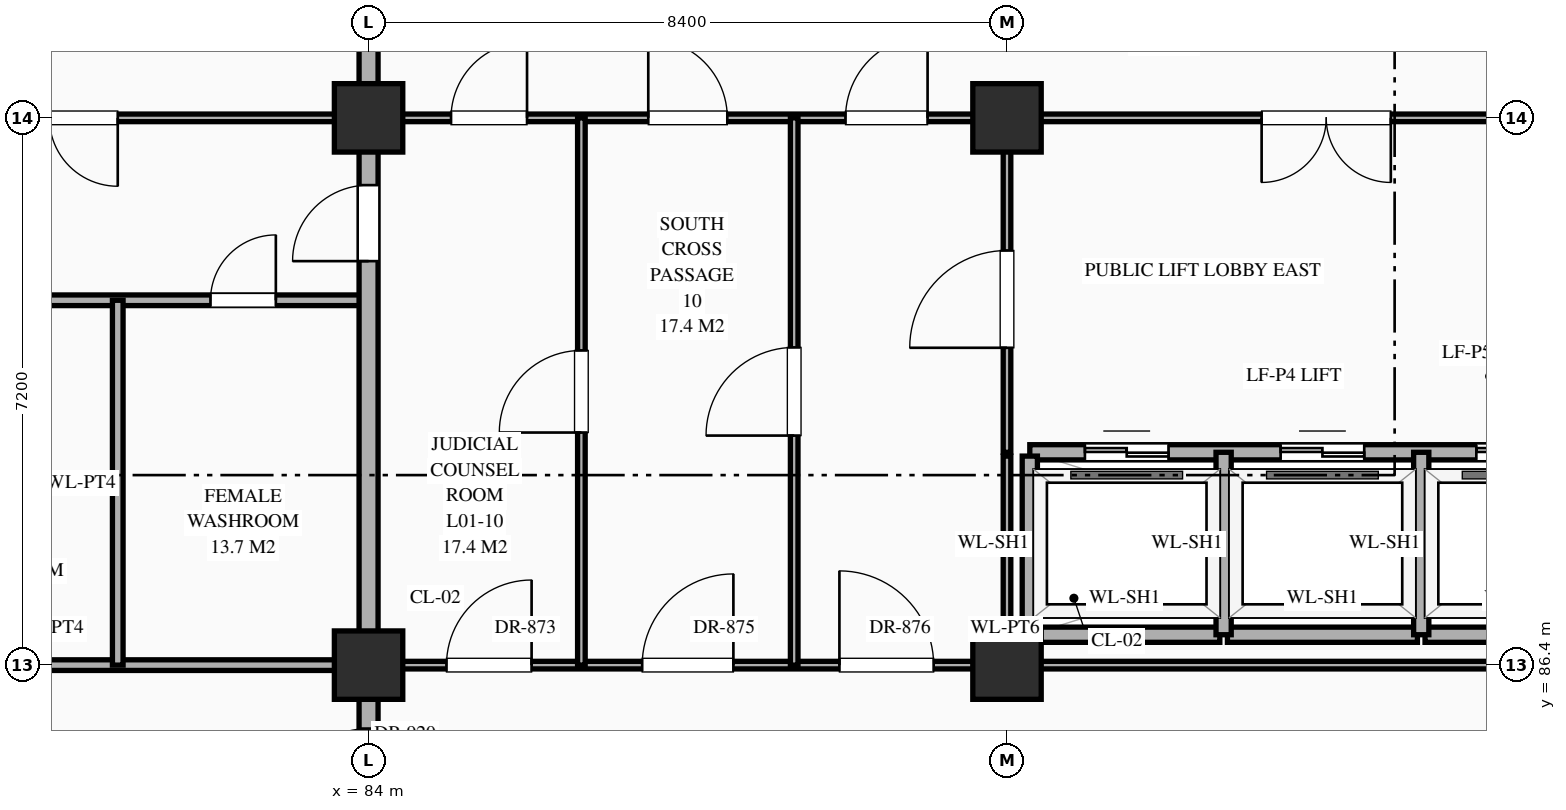
"""IFC4 building model, lengths in metres.
Left out: names, types, materials, properties, quantities, classifications, styles, units other than length and angle.
Written with IfcOpenShell. Run it as: python <this file> out.ifc"""

import sys

from ifc_helpers import new_model, si_unit, direction, frame, frame_2d, origin, origin_2d, place, context, subcontext, project, spatial, rectangle, extrude, element, fill, save


model = new_model("IFC4")
c1 = context("Model", 3, precision=1e-05, world=origin(), true_north=direction((0.0, 1.0)))
c2 = subcontext(c1, "Body", "Model", "MODEL_VIEW")
j1 = project(units=[si_unit("LENGTHUNIT", "METRE"), si_unit("PLANEANGLEUNIT", "RADIAN")], contexts=[c1])
p1 = place(None, origin())
s1 = spatial("IfcSite", under=j1, at=p1, CompositionType="ELEMENT")
p2 = place(p1, origin())
s2 = spatial("IfcBuilding", under=s1, at=p2, CompositionType="ELEMENT")
p3 = place(p2, origin())
s3 = spatial("IfcBuildingStorey", under=s2, at=p3, CompositionType="ELEMENT", Elevation=0.0)
for number, where, z_axis, x_axis in (
    (1, (84.0, 86.4, 0.0), (0.0, 0.0, 1.0), (1.0, 0.0, 0.0)),
    (2, (84.0, 93.6, 0.0), (0.0, 0.0, 1.0), (1.0, 0.0, 0.0)),
    (3, (92.4, 86.4, 0.0), (0.0, 0.0, 1.0), (1.0, 0.0, 0.0)),
    (4, (92.4, 93.6, 0.0), (0.0, 0.0, 1.0), (1.0, 0.0, 0.0)),
):
    element("IfcColumn", number, at=place(p3, frame(where, z_axis=z_axis, x_axis=x_axis)), inside=s3, PredefinedType="COLUMN", context=c2, shape_type="SweptSolid", body=[
        extrude(rectangle(XDim=0.9, YDim=0.9, at=origin_2d()), origin(), (0.0, 0.0, 1.0), 5.4),
    ])
p4 = place(p3, frame((75.6, 86.4, 0.0), z_axis=(0.0, 0.0, 1.0), x_axis=(1.0, 0.0, 0.0)))
e5 = element("IfcWall", 5, at=p4, inside=s3, PredefinedType="STANDARD", context=c2, shape_type="SweptSolid", body=[
    extrude(rectangle(XDim=8.4, YDim=0.14, at=frame_2d((4.2, 0.0))), origin(), (0.0, 0.0, 1.0), 4.27),
])
p5 = place(p3, frame((84.0, 86.4, 0.0), z_axis=(0.0, 0.0, 1.0), x_axis=(1.0, 0.0, 0.0)))
e6 = element("IfcWall", 6, at=p5, inside=s3, PredefinedType="STANDARD", context=c2, shape_type="SweptSolid", body=[
    extrude(rectangle(XDim=8.4, YDim=0.1, at=frame_2d((4.2, 0.0))), origin(), (0.0, 0.0, 1.0), 4.27),
])
p6 = place(p5, frame((1.025, 0.0, 0.0)))
e7 = element("IfcOpeningElement", 7, at=p6, cuts=e6, PredefinedType="OPENING", context=c2, shape_type="SweptSolid", body=[
    extrude(rectangle(XDim=1.12, YDim=2.25, at=frame_2d((0.56, 1.125))), frame((0.0, 0.062, 0.0), z_axis=(0.0, -1.0, 0.0), x_axis=(1.0, 0.0, 0.0)), (0.0, 0.0, 1.0), 0.124),
])
p7 = place(p5, frame((3.6, 0.0, 0.0)))
e8 = element("IfcOpeningElement", 8, at=p7, cuts=e6, PredefinedType="OPENING", context=c2, shape_type="SweptSolid", body=[
    extrude(rectangle(XDim=1.2, YDim=2.35, at=frame_2d((0.6, 1.175))), frame((0.0, 0.062, 0.0), z_axis=(0.0, -1.0, 0.0), x_axis=(1.0, 0.0, 0.0)), (0.0, 0.0, 1.0), 0.124),
])
p8 = place(p5, frame((6.195, 0.0, 0.0)))
e9 = element("IfcOpeningElement", 9, at=p8, cuts=e6, PredefinedType="OPENING", context=c2, shape_type="SweptSolid", body=[
    extrude(rectangle(XDim=1.24, YDim=2.3, at=frame_2d((0.62, 1.15))), frame((0.0, 0.062, 0.0), z_axis=(0.0, -1.0, 0.0), x_axis=(1.0, 0.0, 0.0)), (0.0, 0.0, 1.0), 0.124),
])
p9 = place(p3, frame((92.45, 86.4, 0.0), z_axis=(0.0, 0.0, 1.0), x_axis=(1.0, 0.0, 0.0)))
e10 = element("IfcWall", 10, at=p9, inside=s3, PredefinedType="STANDARD", context=c2, shape_type="SweptSolid", body=[
    extrude(rectangle(XDim=8.3, YDim=0.1, at=frame_2d((4.15, 0.0))), origin(), (0.0, 0.0, 1.0), 4.27),
])
for number, where, z_axis, x_axis in (
    (11, (92.7, 86.8, 0.0), (0.0, 0.0, 1.0), (1.0, 0.0, 0.0)),
    (12, (95.3, 86.8, 0.0), (0.0, 0.0, 1.0), (1.0, 0.0, 0.0)),
    (13, (97.9, 86.8, 0.0), (0.0, 0.0, 1.0), (1.0, 0.0, 0.0)),
):
    element("IfcWall", number, at=place(p3, frame(where, z_axis=z_axis, x_axis=x_axis)), inside=s3, PredefinedType="STANDARD", context=c2, shape_type="SweptSolid", body=[
        extrude(rectangle(XDim=2.5, YDim=0.2, at=frame_2d((1.25, 0.0))), origin(), (0.0, 0.0, 1.0), 5.12),
    ])
p10 = place(p3, frame((92.7, 89.2, 0.0), z_axis=(0.0, 0.0, 1.0), x_axis=(1.0, 0.0, 0.0)))
e14 = element("IfcWall", 14, at=p10, inside=s3, PredefinedType="STANDARD", context=c2, shape_type="SweptSolid", body=[
    extrude(rectangle(XDim=7.7, YDim=0.2, at=frame_2d((3.85, 0.0))), origin(), (0.0, 0.0, 1.0), 5.12),
])
p11 = place(p10, frame((0.725, 0.0, 0.0)))
e15 = element("IfcOpeningElement", 15, at=p11, cuts=e14, PredefinedType="OPENING", context=c2, shape_type="SweptSolid", body=[
    extrude(rectangle(XDim=1.1, YDim=2.15, at=frame_2d((0.55, 1.075))), frame((0.0, 0.112, 0.0), z_axis=(0.0, -1.0, 0.0), x_axis=(1.0, 0.0, 0.0)), (0.0, 0.0, 1.0), 0.224),
])
p12 = place(p10, frame((3.3, 0.0, 0.0)))
e16 = element("IfcOpeningElement", 16, at=p12, cuts=e14, PredefinedType="OPENING", context=c2, shape_type="SweptSolid", body=[
    extrude(rectangle(XDim=1.1, YDim=2.15, at=frame_2d((0.55, 1.075))), frame((0.0, 0.112, 0.0), z_axis=(0.0, -1.0, 0.0), x_axis=(1.0, 0.0, 0.0)), (0.0, 0.0, 1.0), 0.224),
])
p13 = place(p10, frame((5.875, 0.0, 0.0)))
e17 = element("IfcOpeningElement", 17, at=p13, cuts=e14, PredefinedType="OPENING", context=c2, shape_type="SweptSolid", body=[
    extrude(rectangle(XDim=1.1, YDim=2.15, at=frame_2d((0.55, 1.075))), frame((0.0, 0.112, 0.0), z_axis=(0.0, -1.0, 0.0), x_axis=(1.0, 0.0, 0.0)), (0.0, 0.0, 1.0), 0.224),
])
p14 = place(p3, frame((75.6, 91.2, 0.0), z_axis=(0.0, 0.0, 1.0), x_axis=(1.0, 0.0, 0.0)))
e18 = element("IfcWall", 18, at=p14, inside=s3, PredefinedType="STANDARD", context=c2, shape_type="SweptSolid", body=[
    extrude(rectangle(XDim=8.4, YDim=0.14, at=frame_2d((4.2, 0.0))), origin(), (0.0, 0.0, 1.0), 5.12),
])
p15 = place(p14, frame((0.65, 0.0, 0.0)))
e19 = element("IfcOpeningElement", 19, at=p15, cuts=e18, PredefinedType="OPENING", context=c2, shape_type="SweptSolid", body=[
    extrude(rectangle(XDim=0.9, YDim=2.15, at=frame_2d((0.45, 1.075))), frame((0.0, 0.082, 0.0), z_axis=(0.0, -1.0, 0.0), x_axis=(1.0, 0.0, 0.0)), (0.0, 0.0, 1.0), 0.164),
])
p16 = place(p14, frame((3.22, 0.0, 0.0)))
e20 = element("IfcOpeningElement", 20, at=p16, cuts=e18, PredefinedType="OPENING", context=c2, shape_type="SweptSolid", body=[
    extrude(rectangle(XDim=0.86, YDim=2.1, at=frame_2d((0.43, 1.05))), frame((0.0, 0.082, 0.0), z_axis=(0.0, -1.0, 0.0), x_axis=(1.0, 0.0, 0.0)), (0.0, 0.0, 1.0), 0.164),
])
p17 = place(p14, frame((6.32, 0.0, 0.0)))
e21 = element("IfcOpeningElement", 21, at=p17, cuts=e18, PredefinedType="OPENING", context=c2, shape_type="SweptSolid", body=[
    extrude(rectangle(XDim=0.86, YDim=2.1, at=frame_2d((0.43, 1.05))), frame((0.0, 0.082, 0.0), z_axis=(0.0, -1.0, 0.0), x_axis=(1.0, 0.0, 0.0)), (0.0, 0.0, 1.0), 0.164),
])
p18 = place(p3, frame((67.2, 93.6, 0.0), z_axis=(0.0, 0.0, 1.0), x_axis=(1.0, 0.0, 0.0)))
e22 = element("IfcWall", 22, at=p18, inside=s3, PredefinedType="STANDARD", context=c2, shape_type="SweptSolid", body=[
    extrude(rectangle(XDim=33.6, YDim=0.1, at=frame_2d((16.8, 0.0))), origin(), (0.0, 0.0, 1.0), 4.27),
])
p19 = place(p18, frame((3.425, 0.0, 0.0)))
e23 = element("IfcOpeningElement", 23, at=p19, cuts=e22, PredefinedType="OPENING", context=c2, shape_type="SweptSolid", body=[
    extrude(rectangle(XDim=1.55, YDim=2.35, at=frame_2d((0.775, 1.175))), frame((0.0, 0.062, 0.0), z_axis=(0.0, -1.0, 0.0), x_axis=(1.0, 0.0, 0.0)), (0.0, 0.0, 1.0), 0.124),
])
p20 = place(p18, frame((28.55, 0.0, 0.0)))
e24 = element("IfcOpeningElement", 24, at=p20, cuts=e22, PredefinedType="OPENING", context=c2, shape_type="SweptSolid", body=[
    extrude(rectangle(XDim=1.7, YDim=2.45, at=frame_2d((0.85, 1.225))), frame((0.0, 0.062, 0.0), z_axis=(0.0, -1.0, 0.0), x_axis=(1.0, 0.0, 0.0)), (0.0, 0.0, 1.0), 0.124),
])
p21 = place(p18, frame((11.7, 0.0, 0.0)))
e25 = element("IfcOpeningElement", 25, at=p21, cuts=e22, PredefinedType="OPENING", context=c2, shape_type="SweptSolid", body=[
    extrude(rectangle(XDim=1.8, YDim=2.5, at=frame_2d((0.9, 1.25))), frame((0.0, 0.062, 0.0), z_axis=(0.0, -1.0, 0.0), x_axis=(1.0, 0.0, 0.0)), (0.0, 0.0, 1.0), 0.124),
])
p22 = place(p18, frame((17.885, 0.0, 0.0)))
e26 = element("IfcOpeningElement", 26, at=p22, cuts=e22, PredefinedType="OPENING", context=c2, shape_type="SweptSolid", body=[
    extrude(rectangle(XDim=1.0, YDim=2.25, at=frame_2d((0.5, 1.125))), frame((0.0, 0.062, 0.0), z_axis=(0.0, -1.0, 0.0), x_axis=(1.0, 0.0, 0.0)), (0.0, 0.0, 1.0), 0.124),
])
p23 = place(p18, frame((20.48, 0.0, 0.0)))
e27 = element("IfcOpeningElement", 27, at=p23, cuts=e22, PredefinedType="OPENING", context=c2, shape_type="SweptSolid", body=[
    extrude(rectangle(XDim=1.04, YDim=2.2, at=frame_2d((0.52, 1.1))), frame((0.0, 0.062, 0.0), z_axis=(0.0, -1.0, 0.0), x_axis=(1.0, 0.0, 0.0)), (0.0, 0.0, 1.0), 0.124),
])
p24 = place(p18, frame((23.075, 0.0, 0.0)))
e28 = element("IfcOpeningElement", 28, at=p24, cuts=e22, PredefinedType="OPENING", context=c2, shape_type="SweptSolid", body=[
    extrude(rectangle(XDim=1.08, YDim=2.25, at=frame_2d((0.54, 1.125))), frame((0.0, 0.062, 0.0), z_axis=(0.0, -1.0, 0.0), x_axis=(1.0, 0.0, 0.0)), (0.0, 0.0, 1.0), 0.124),
])
p25 = place(p3, frame((80.7, 86.4, 0.0), z_axis=(0.0, 0.0, 1.0), x_axis=(0.0, 1.0, 0.0)))
e29 = element("IfcWall", 29, at=p25, inside=s3, PredefinedType="STANDARD", context=c2, shape_type="SweptSolid", body=[
    extrude(rectangle(XDim=4.8, YDim=0.14, at=frame_2d((2.4, 0.0))), origin(), (0.0, 0.0, 1.0), 5.12),
])
p26 = place(p3, frame((84.0, 84.0, 0.0), z_axis=(0.0, 0.0, 1.0), x_axis=(0.0, 1.0, 0.0)))
e30 = element("IfcWall", 30, at=p26, inside=s3, PredefinedType="STANDARD", context=c2, shape_type="SweptSolid", body=[
    extrude(rectangle(XDim=12.0, YDim=0.25, at=frame_2d((6.0, 0.0))), origin(), (0.0, 0.0, 1.0), 4.37),
])
p27 = place(p26, frame((7.715, 0.0, 0.0)))
e31 = element("IfcOpeningElement", 31, at=p27, cuts=e30, PredefinedType="OPENING", context=c2, shape_type="SweptSolid", body=[
    extrude(rectangle(XDim=1.0, YDim=2.2, at=frame_2d((0.5, 1.1))), frame((0.0, 0.137, 0.0), z_axis=(0.0, -1.0, 0.0), x_axis=(1.0, 0.0, 0.0)), (0.0, 0.0, 1.0), 0.274),
])
p28 = place(p26, frame((10.485, 0.0, 0.0)))
e32 = element("IfcOpeningElement", 32, at=p28, cuts=e30, PredefinedType="OPENING", context=c2, shape_type="SweptSolid", body=[
    extrude(rectangle(XDim=1.0, YDim=2.2, at=frame_2d((0.5, 1.1))), frame((0.0, 0.137, 0.0), z_axis=(0.0, -1.0, 0.0), x_axis=(1.0, 0.0, 0.0)), (0.0, 0.0, 1.0), 0.274),
])
p29 = place(p26, frame((0.465, 0.0, 0.0)))
e33 = element("IfcOpeningElement", 33, at=p29, cuts=e30, PredefinedType="OPENING", context=c2, shape_type="SweptSolid", body=[
    extrude(rectangle(XDim=1.1, YDim=2.2, at=frame_2d((0.55, 1.1))), frame((0.0, 0.137, 0.0), z_axis=(0.0, -1.0, 0.0), x_axis=(1.0, 0.0, 0.0)), (0.0, 0.0, 1.0), 0.274),
])
p30 = place(p3, frame((86.8, 86.4, 0.0), z_axis=(0.0, 0.0, 1.0), x_axis=(0.0, 1.0, 0.0)))
e34 = element("IfcWall", 34, at=p30, inside=s3, PredefinedType="STANDARD", context=c2, shape_type="SweptSolid", body=[
    extrude(rectangle(XDim=7.2, YDim=0.1, at=frame_2d((3.6, 0.0))), origin(), (0.0, 0.0, 1.0), 5.12),
])
p31 = place(p30, frame((3.06, 0.0, 0.0)))
e35 = element("IfcOpeningElement", 35, at=p31, cuts=e34, PredefinedType="OPENING", context=c2, shape_type="SweptSolid", body=[
    extrude(rectangle(XDim=1.08, YDim=2.25, at=frame_2d((0.54, 1.125))), frame((0.0, 0.062, 0.0), z_axis=(0.0, -1.0, 0.0), x_axis=(1.0, 0.0, 0.0)), (0.0, 0.0, 1.0), 0.124),
])
p32 = place(p3, frame((89.6, 86.4, 0.0), z_axis=(0.0, 0.0, 1.0), x_axis=(0.0, 1.0, 0.0)))
e36 = element("IfcWall", 36, at=p32, inside=s3, PredefinedType="STANDARD", context=c2, shape_type="SweptSolid", body=[
    extrude(rectangle(XDim=7.2, YDim=0.1, at=frame_2d((3.6, 0.0))), origin(), (0.0, 0.0, 1.0), 5.12),
])
p33 = place(p32, frame((3.02, 0.0, 0.0)))
e37 = element("IfcOpeningElement", 37, at=p33, cuts=e36, PredefinedType="OPENING", context=c2, shape_type="SweptSolid", body=[
    extrude(rectangle(XDim=1.16, YDim=2.3, at=frame_2d((0.58, 1.15))), frame((0.0, 0.062, 0.0), z_axis=(0.0, -1.0, 0.0), x_axis=(1.0, 0.0, 0.0)), (0.0, 0.0, 1.0), 0.124),
])
p34 = place(p3, frame((92.4, 86.45, 0.0), z_axis=(0.0, 0.0, 1.0), x_axis=(0.0, 1.0, 0.0)))
e38 = element("IfcWall", 38, at=p34, inside=s3, PredefinedType="STANDARD", context=c2, shape_type="SweptSolid", body=[
    extrude(rectangle(XDim=2.7, YDim=0.1, at=frame_2d((1.35, 0.0))), origin(), (0.0, 0.0, 1.0), 4.37),
])
p35 = place(p3, frame((92.4, 89.2, 0.0), z_axis=(0.0, 0.0, 1.0), x_axis=(0.0, 1.0, 0.0)))
e39 = element("IfcWall", 39, at=p35, inside=s3, PredefinedType="STANDARD", context=c2, shape_type="SweptSolid", body=[
    extrude(rectangle(XDim=4.4, YDim=0.1, at=frame_2d((2.2, 0.0))), origin(), (0.0, 0.0, 1.0), 4.37),
])
p36 = place(p35, frame((1.375, 0.0, 0.0)))
e40 = element("IfcOpeningElement", 40, at=p36, cuts=e39, PredefinedType="OPENING", context=c2, shape_type="SweptSolid", body=[
    extrude(rectangle(XDim=1.28, YDim=2.35, at=frame_2d((0.64, 1.175))), frame((0.0, 0.062, 0.0), z_axis=(0.0, -1.0, 0.0), x_axis=(1.0, 0.0, 0.0)), (0.0, 0.0, 1.0), 0.124),
])
p37 = place(p3, frame((92.7, 86.85, 0.0), z_axis=(0.0, 0.0, 1.0), x_axis=(0.0, 1.0, 0.0)))
e41 = element("IfcWall", 41, at=p37, inside=s3, PredefinedType="STANDARD", context=c2, shape_type="SweptSolid", body=[
    extrude(rectangle(XDim=2.3, YDim=0.2, at=frame_2d((1.15, 0.0))), origin(), (0.0, 0.0, 1.0), 5.12),
])
for number, where, z_axis, x_axis in (
    (42, (95.25, 86.8, 0.0), (0.0, 0.0, 1.0), (0.0, 1.0, 0.0)),
    (43, (97.85, 86.8, 0.0), (0.0, 0.0, 1.0), (0.0, 1.0, 0.0)),
):
    element("IfcWall", number, at=place(p3, frame(where, z_axis=z_axis, x_axis=x_axis)), inside=s3, PredefinedType="STANDARD", context=c2, shape_type="SweptSolid", body=[
        extrude(rectangle(XDim=2.4, YDim=0.2, at=frame_2d((1.2, 0.0))), origin(), (0.0, 0.0, 1.0), 5.12),
    ])
p38 = place(p11, origin())
e44 = element("IfcDoor", 44, at=p38, inside=s3, OperationType="DOUBLE_DOOR_SLIDING", PredefinedType="DOOR", context=c2, shape_type="SweptSolid", body=[
    extrude(rectangle(XDim=1.1, YDim=2.15, at=frame_2d((0.55, 1.075))), frame((0.0, 0.025, 0.0), z_axis=(0.0, -1.0, 0.0), x_axis=(1.0, 0.0, 0.0)), (0.0, 0.0, 1.0), 0.05),
])
fill(e15, e44)
p39 = place(p12, origin())
e45 = element("IfcDoor", 45, at=p39, inside=s3, OperationType="DOUBLE_DOOR_SLIDING", PredefinedType="DOOR", context=c2, shape_type="SweptSolid", body=[
    extrude(rectangle(XDim=1.1, YDim=2.15, at=frame_2d((0.55, 1.075))), frame((0.0, 0.025, 0.0), z_axis=(0.0, -1.0, 0.0), x_axis=(1.0, 0.0, 0.0)), (0.0, 0.0, 1.0), 0.05),
])
fill(e16, e45)
p40 = place(p13, origin())
e46 = element("IfcDoor", 46, at=p40, inside=s3, OperationType="DOUBLE_DOOR_SLIDING", PredefinedType="DOOR", context=c2, shape_type="SweptSolid", body=[
    extrude(rectangle(XDim=1.1, YDim=2.15, at=frame_2d((0.55, 1.075))), frame((0.0, 0.025, 0.0), z_axis=(0.0, -1.0, 0.0), x_axis=(1.0, 0.0, 0.0)), (0.0, 0.0, 1.0), 0.05),
])
fill(e17, e46)
p41 = place(p20, frame((1.7, 0.0, 0.0), z_axis=(0.0, 0.0, 1.0), x_axis=(-1.0, 0.0, 0.0)))
e47 = element("IfcDoor", 47, at=p41, inside=s3, OperationType="DOUBLE_DOOR_SINGLE_SWING", PredefinedType="DOOR", context=c2, shape_type="SweptSolid", body=[
    extrude(rectangle(XDim=1.7, YDim=2.45, at=frame_2d((0.85, 1.225))), frame((0.0, 0.025, 0.0), z_axis=(0.0, -1.0, 0.0), x_axis=(1.0, 0.0, 0.0)), (0.0, 0.0, 1.0), 0.05),
])
fill(e24, e47)
p42 = place(p36, origin())
e48 = element("IfcDoor", 48, at=p42, inside=s3, OperationType="SINGLE_SWING_LEFT", PredefinedType="DOOR", context=c2, shape_type="SweptSolid", body=[
    extrude(rectangle(XDim=1.28, YDim=2.35, at=frame_2d((0.64, 1.175))), frame((0.0, 0.025, 0.0), z_axis=(0.0, -1.0, 0.0), x_axis=(1.0, 0.0, 0.0)), (0.0, 0.0, 1.0), 0.05),
])
fill(e40, e48)
p43 = place(p17, origin())
e49 = element("IfcDoor", 49, at=p43, inside=s3, OperationType="SINGLE_SWING_RIGHT", PredefinedType="DOOR", context=c2, shape_type="SweptSolid", body=[
    extrude(rectangle(XDim=0.86, YDim=2.1, at=frame_2d((0.43, 1.05))), frame((0.0, 0.025, 0.0), z_axis=(0.0, -1.0, 0.0), x_axis=(1.0, 0.0, 0.0)), (0.0, 0.0, 1.0), 0.05),
])
fill(e21, e49)
p44 = place(p21, frame((1.8, 0.0, 0.0), z_axis=(0.0, 0.0, 1.0), x_axis=(-1.0, 0.0, 0.0)))
e50 = element("IfcDoor", 50, at=p44, inside=s3, OperationType="DOUBLE_DOOR_SINGLE_SWING", PredefinedType="DOOR", context=c2, shape_type="SweptSolid", body=[
    extrude(rectangle(XDim=1.8, YDim=2.5, at=frame_2d((0.9, 1.25))), frame((0.0, 0.025, 0.0), z_axis=(0.0, -1.0, 0.0), x_axis=(1.0, 0.0, 0.0)), (0.0, 0.0, 1.0), 0.05),
])
fill(e25, e50)
p45 = place(p27, origin())
e51 = element("IfcDoor", 51, at=p45, inside=s3, OperationType="SINGLE_SWING_LEFT", PredefinedType="DOOR", context=c2, shape_type="SweptSolid", body=[
    extrude(rectangle(XDim=1.0, YDim=2.2, at=frame_2d((0.5, 1.1))), frame((0.0, 0.025, 0.0), z_axis=(0.0, -1.0, 0.0), x_axis=(1.0, 0.0, 0.0)), (0.0, 0.0, 1.0), 0.05),
])
fill(e31, e51)
p46 = place(p22, origin())
e52 = element("IfcDoor", 52, at=p46, inside=s3, OperationType="SINGLE_SWING_RIGHT", PredefinedType="DOOR", context=c2, shape_type="SweptSolid", body=[
    extrude(rectangle(XDim=1.0, YDim=2.25, at=frame_2d((0.5, 1.125))), frame((0.0, 0.025, 0.0), z_axis=(0.0, -1.0, 0.0), x_axis=(1.0, 0.0, 0.0)), (0.0, 0.0, 1.0), 0.05),
])
fill(e26, e52)
p47 = place(p23, origin())
e53 = element("IfcDoor", 53, at=p47, inside=s3, OperationType="SINGLE_SWING_LEFT", PredefinedType="DOOR", context=c2, shape_type="SweptSolid", body=[
    extrude(rectangle(XDim=1.04, YDim=2.2, at=frame_2d((0.52, 1.1))), frame((0.0, 0.025, 0.0), z_axis=(0.0, -1.0, 0.0), x_axis=(1.0, 0.0, 0.0)), (0.0, 0.0, 1.0), 0.05),
])
fill(e27, e53)
p48 = place(p24, origin())
e54 = element("IfcDoor", 54, at=p48, inside=s3, OperationType="SINGLE_SWING_RIGHT", PredefinedType="DOOR", context=c2, shape_type="SweptSolid", body=[
    extrude(rectangle(XDim=1.08, YDim=2.25, at=frame_2d((0.54, 1.125))), frame((0.0, 0.025, 0.0), z_axis=(0.0, -1.0, 0.0), x_axis=(1.0, 0.0, 0.0)), (0.0, 0.0, 1.0), 0.05),
])
fill(e28, e54)
p49 = place(p31, origin())
e55 = element("IfcDoor", 55, at=p49, inside=s3, OperationType="SINGLE_SWING_LEFT", PredefinedType="DOOR", context=c2, shape_type="SweptSolid", body=[
    extrude(rectangle(XDim=1.08, YDim=2.25, at=frame_2d((0.54, 1.125))), frame((0.0, 0.025, 0.0), z_axis=(0.0, -1.0, 0.0), x_axis=(1.0, 0.0, 0.0)), (0.0, 0.0, 1.0), 0.05),
])
fill(e35, e55)
p50 = place(p6, origin())
e56 = element("IfcDoor", 56, at=p50, inside=s3, OperationType="SINGLE_SWING_RIGHT", PredefinedType="DOOR", context=c2, shape_type="SweptSolid", body=[
    extrude(rectangle(XDim=1.12, YDim=2.25, at=frame_2d((0.56, 1.125))), frame((0.0, 0.025, 0.0), z_axis=(0.0, -1.0, 0.0), x_axis=(1.0, 0.0, 0.0)), (0.0, 0.0, 1.0), 0.05),
])
fill(e7, e56)
p51 = place(p33, origin())
e57 = element("IfcDoor", 57, at=p51, inside=s3, OperationType="SINGLE_SWING_LEFT", PredefinedType="DOOR", context=c2, shape_type="SweptSolid", body=[
    extrude(rectangle(XDim=1.16, YDim=2.3, at=frame_2d((0.58, 1.15))), frame((0.0, 0.025, 0.0), z_axis=(0.0, -1.0, 0.0), x_axis=(1.0, 0.0, 0.0)), (0.0, 0.0, 1.0), 0.05),
])
fill(e37, e57)
p52 = place(p7, origin())
e58 = element("IfcDoor", 58, at=p52, inside=s3, OperationType="SINGLE_SWING_RIGHT", PredefinedType="DOOR", context=c2, shape_type="SweptSolid", body=[
    extrude(rectangle(XDim=1.2, YDim=2.35, at=frame_2d((0.6, 1.175))), frame((0.0, 0.025, 0.0), z_axis=(0.0, -1.0, 0.0), x_axis=(1.0, 0.0, 0.0)), (0.0, 0.0, 1.0), 0.05),
])
fill(e8, e58)
p53 = place(p8, origin())
e59 = element("IfcDoor", 59, at=p53, inside=s3, OperationType="SINGLE_SWING_LEFT", PredefinedType="DOOR", context=c2, shape_type="SweptSolid", body=[
    extrude(rectangle(XDim=1.24, YDim=2.3, at=frame_2d((0.62, 1.15))), frame((0.0, 0.025, 0.0), z_axis=(0.0, -1.0, 0.0), x_axis=(1.0, 0.0, 0.0)), (0.0, 0.0, 1.0), 0.05),
])
fill(e9, e59)
p54 = place(p29, origin())
e60 = element("IfcDoor", 60, at=p54, inside=s3, OperationType="SINGLE_SWING_LEFT", PredefinedType="DOOR", context=c2, shape_type="SweptSolid", body=[
    extrude(rectangle(XDim=1.1, YDim=2.2, at=frame_2d((0.55, 1.1))), frame((0.0, 0.025, 0.0), z_axis=(0.0, -1.0, 0.0), x_axis=(1.0, 0.0, 0.0)), (0.0, 0.0, 1.0), 0.05),
])
fill(e33, e60)
save(model, sys.argv[1])
